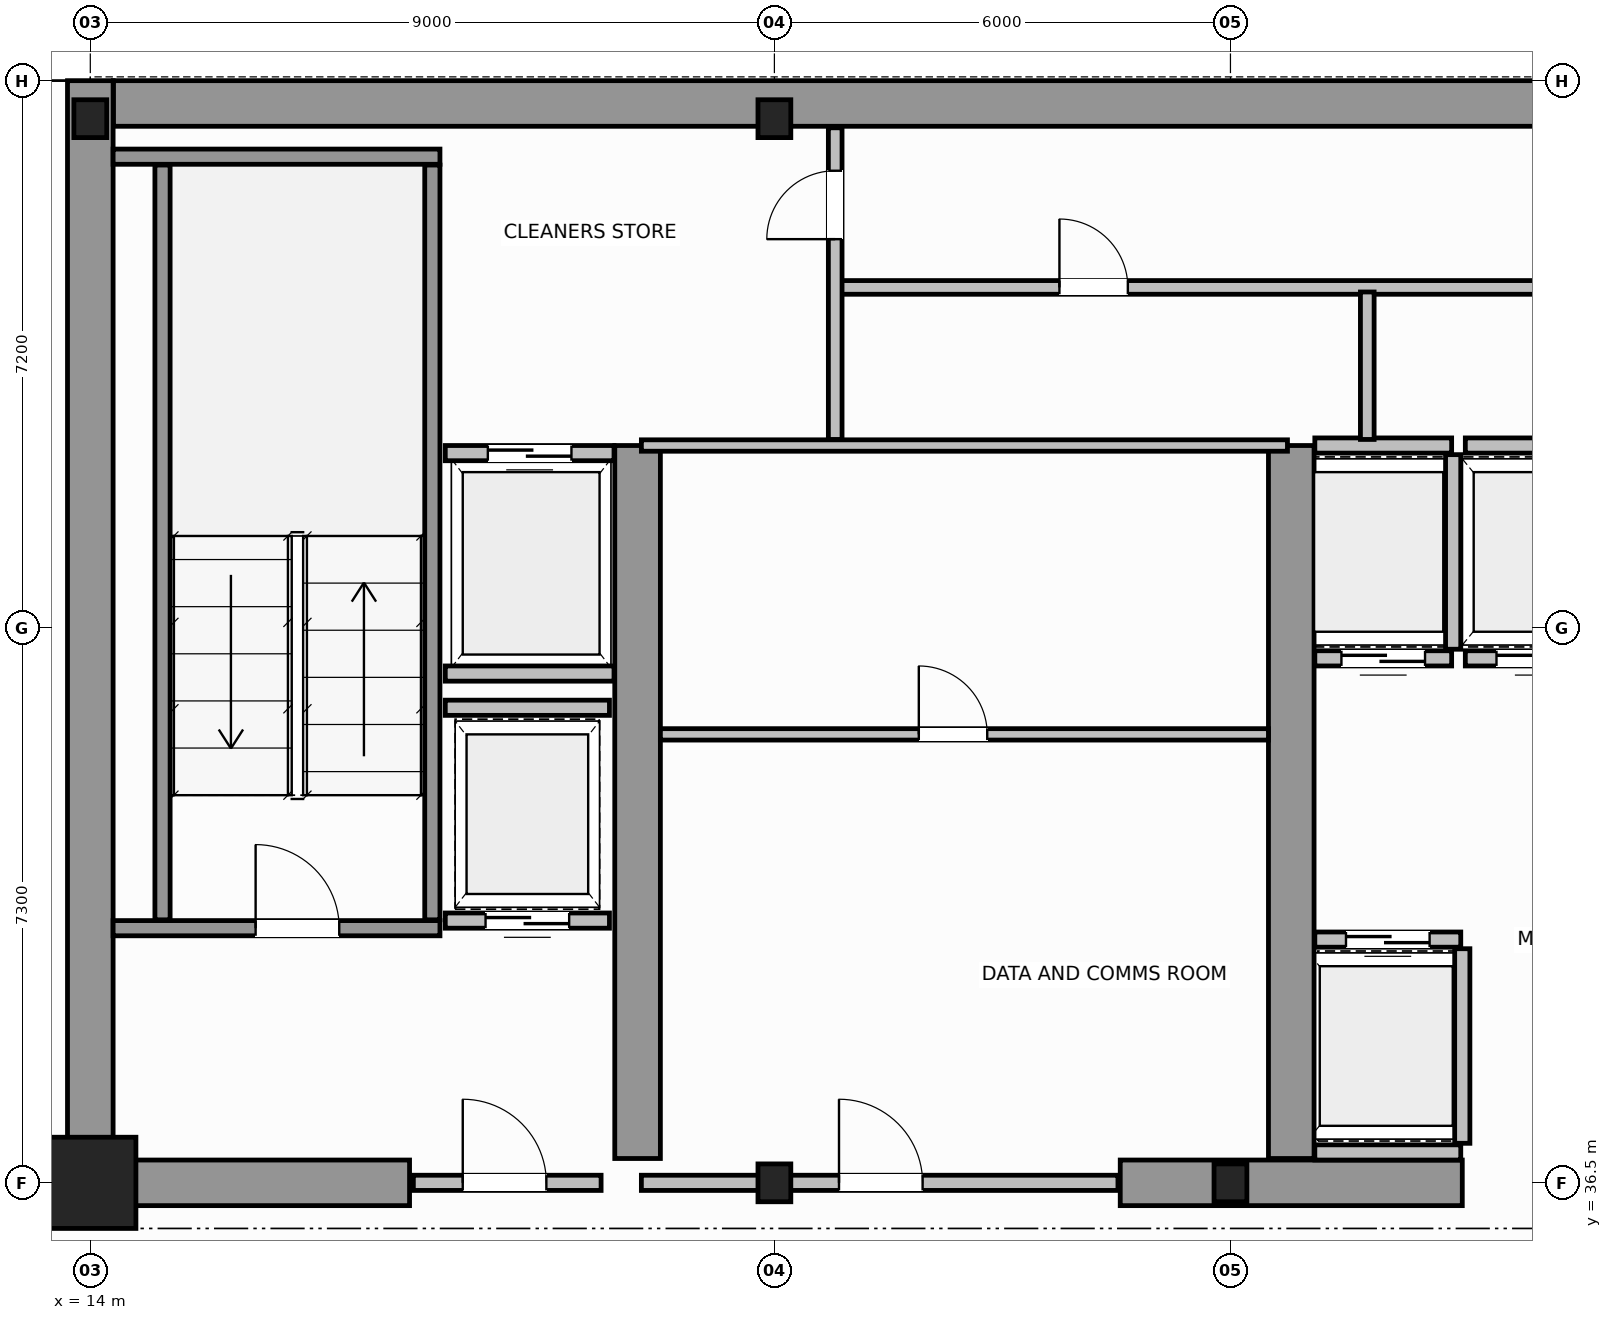
"""IFC4 building model, lengths in metres.
Left out: names, types, materials, properties, quantities, classifications, styles, units other than length and angle.
Written with IfcOpenShell. Run it as: python <this file> out.ifc"""

import sys

from ifc_helpers import new_model, si_unit, direction, frame, frame_2d, origin, origin_2d, place, context, subcontext, project, spatial, rectangle, i_section, extrude, source, transform, mapped, element, fill, save


model = new_model("IFC4")
c1 = context("Model", 3, precision=1e-05, world=origin(), true_north=direction((0.0, 1.0)))
c2 = subcontext(c1, "Body", "Model", "MODEL_VIEW")
j1 = project(units=[si_unit("LENGTHUNIT", "METRE"), si_unit("PLANEANGLEUNIT", "RADIAN")], contexts=[c1])
p1 = place(None, origin())
s1 = spatial("IfcSite", under=j1, at=p1, CompositionType="ELEMENT")
p2 = place(p1, origin())
s2 = spatial("IfcBuilding", under=s1, at=p2, CompositionType="ELEMENT")
p3 = place(p2, frame((0.0, 0.0, 199.4)))
s3 = spatial("IfcBuildingStorey", under=s2, at=p3, CompositionType="ELEMENT", Elevation=199.4)
m1 = source(origin(), c2, "Body", "SweptSolid", [
    extrude(rectangle(XDim=1.2, YDim=1.2, at=origin_2d()), origin(), (0.0, 0.0, 1.0), 3.8),
])
p4 = place(p3, frame((14.0, 36.5, 0.0), z_axis=(0.0, 0.0, 1.0), x_axis=(1.0, 0.0, 0.0)))
e1 = element("IfcColumn", 1, at=p4, inside=s3, PredefinedType="COLUMN", context=c2, shape_type="MappedRepresentation", body=[
    mapped(m1, transform((0.0, 0.0, 0.0), scale=1.0)),
])
m2 = source(origin(), c2, "Body", "SweptSolid", [
    extrude(i_section(OverallWidth=0.432, OverallDepth=0.498, WebThickness=0.055, FlangeThickness=0.068, FilletRadius=0.015, at=origin_2d()), origin(), (0.0, 0.0, 1.0), 3.8),
])
for number, where, z_axis, x_axis in (
    (2, (23.0, 36.5, 0.0), (0.0, 0.0, 1.0), (1.0, 0.0, 0.0)),
    (3, (29.0, 36.5, 0.0), (0.0, 0.0, 1.0), (1.0, 0.0, 0.0)),
    (4, (14.0, 50.5, 0.0), (0.0, 0.0, 1.0), (1.0, 0.0, 0.0)),
    (5, (23.0, 50.5, 0.0), (0.0, 0.0, 1.0), (1.0, 0.0, 0.0)),
):
    element("IfcColumn", number, at=place(p3, frame(where, z_axis=z_axis, x_axis=x_axis)), inside=s3, PredefinedType="COLUMN", context=c2, shape_type="MappedRepresentation", body=[
        mapped(m2, transform((0.0, 0.0, 0.0), scale=1.0)),
    ])
p5 = place(p3, frame((14.304, 50.7, 0.0), z_axis=(0.0, 0.0, 1.0), x_axis=(1.0, 0.0, 0.0)))
e6 = element("IfcWall", 6, at=p5, inside=s3, PredefinedType="SHEAR", context=c2, shape_type="SweptSolid", body=[
    extrude(rectangle(XDim=19.694, YDim=0.6, at=frame_2d((9.847, 0.0))), origin(), (0.0, 0.0, 1.0), 3.8),
])
p6 = place(p3, frame((14.0, 36.5, 0.0), z_axis=(0.0, 0.0, 1.0), x_axis=(0.0, 1.0, 0.0)))
e7 = element("IfcWall", 7, at=p6, inside=s3, PredefinedType="SHEAR", context=c2, shape_type="SweptSolid", body=[
    extrude(rectangle(XDim=14.5, YDim=0.6, at=frame_2d((7.25, 0.0))), origin(), (0.0, 0.0, 1.0), 3.8),
])
p7 = place(p3, frame((14.32, 36.5, 0.0), z_axis=(0.0, 0.0, 1.0), x_axis=(1.0, 0.0, 0.0)))
e8 = element("IfcWall", 8, at=p7, inside=s3, PredefinedType="SHEAR", context=c2, shape_type="SweptSolid", body=[
    extrude(rectangle(XDim=3.88, YDim=0.6, at=frame_2d((1.94, 0.0))), origin(), (0.0, 0.0, 1.0), 2.58),
])
p8 = place(p3, frame((27.55, 36.5, 0.0), z_axis=(0.0, 0.0, 1.0), x_axis=(1.0, 0.0, 0.0)))
e9 = element("IfcWall", 9, at=p8, inside=s3, PredefinedType="SHEAR", context=c2, shape_type="SweptSolid", body=[
    extrude(rectangle(XDim=4.5, YDim=0.6, at=frame_2d((2.25, 0.0))), origin(), (0.0, 0.0, 1.0), 3.8),
])
for number, where, z_axis, x_axis in (
    (10, (21.2, 36.82, 0.0), (0.0, 0.0, 1.0), (0.0, 1.0, 0.0)),
    (11, (29.8, 36.82, 0.0), (0.0, 0.0, 1.0), (0.0, 1.0, 0.0)),
):
    element("IfcWall", number, at=place(p3, frame(where, z_axis=z_axis, x_axis=x_axis)), inside=s3, PredefinedType="SHEAR", context=c2, shape_type="SweptSolid", body=[
        extrude(rectangle(XDim=9.38, YDim=0.6, at=frame_2d((4.69, 0.0))), origin(), (0.0, 0.0, 1.0), 3.8),
    ])
p9 = place(p3, frame((14.3, 39.85, 0.0), z_axis=(0.0, 0.0, 1.0), x_axis=(1.0, 0.0, 0.0)))
e12 = element("IfcWall", 12, at=p9, inside=s3, PredefinedType="SOLIDWALL", context=c2, shape_type="SweptSolid", body=[
    extrude(rectangle(XDim=4.3, YDim=0.2, at=frame_2d((2.15, 0.0))), origin(), (0.0, 0.0, 1.0), 3.8),
])
p10 = place(p9, frame((1.875, 0.0, 0.0)))
e13 = element("IfcOpeningElement", 13, at=p10, cuts=e12, PredefinedType="OPENING", context=c2, shape_type="SweptSolid", body=[
    extrude(rectangle(XDim=1.1, YDim=2.15, at=frame_2d((0.55, 1.075))), frame((0.0, 0.11, 0.0), z_axis=(0.0, -1.0, 0.0), x_axis=(1.0, 0.0, 0.0)), (0.0, 0.0, 1.0), 0.22),
])
p11 = place(p3, frame((14.3, 50.0, 0.0), z_axis=(0.0, 0.0, 1.0), x_axis=(1.0, 0.0, 0.0)))
e14 = element("IfcWall", 14, at=p11, inside=s3, PredefinedType="SOLIDWALL", context=c2, shape_type="SweptSolid", body=[
    extrude(rectangle(XDim=4.3, YDim=0.2, at=frame_2d((2.15, 0.0))), origin(), (0.0, 0.0, 1.0), 3.8),
])
for number, where, z_axis, x_axis in (
    (15, (14.95, 39.96, 0.0), (0.0, 0.0, 1.0), (0.0, 1.0, 0.0)),
    (16, (18.5, 39.96, 0.0), (0.0, 0.0, 1.0), (0.0, 1.0, 0.0)),
):
    element("IfcWall", number, at=place(p3, frame(where, z_axis=z_axis, x_axis=x_axis)), inside=s3, PredefinedType="SOLIDWALL", context=c2, shape_type="SweptSolid", body=[
        extrude(rectangle(XDim=9.93, YDim=0.2, at=frame_2d((4.965, 0.0))), origin(), (0.0, 0.0, 1.0), 3.8),
    ])
p12 = place(p3, frame((18.25, 36.5, 0.0), z_axis=(0.0, 0.0, 1.0), x_axis=(1.0, 0.0, 0.0)))
e17 = element("IfcWall", 17, at=p12, inside=s3, PredefinedType="SOLIDWALL", context=c2, shape_type="SweptSolid", body=[
    extrude(rectangle(XDim=2.47, YDim=0.2, at=frame_2d((1.235, 0.0))), origin(), (0.0, 0.0, 1.0), 2.57),
])
p13 = place(p12, frame((0.65, 0.0, 0.0)))
e18 = element("IfcOpeningElement", 18, at=p13, cuts=e17, PredefinedType="OPENING", context=c2, shape_type="SweptSolid", body=[
    extrude(rectangle(XDim=1.1, YDim=2.15, at=frame_2d((0.55, 1.075))), frame((0.0, 0.11, 0.0), z_axis=(0.0, -1.0, 0.0), x_axis=(1.0, 0.0, 0.0)), (0.0, 0.0, 1.0), 0.22),
])
p14 = place(p3, frame((30.11, 39.7, 0.0), z_axis=(0.0, 0.0, 1.0), x_axis=(1.0, 0.0, 0.0)))
e19 = element("IfcWall", 19, at=p14, inside=s3, PredefinedType="SOLIDWALL", context=c2, shape_type="SweptSolid", body=[
    extrude(rectangle(XDim=1.92, YDim=0.2, at=frame_2d((0.96, 0.0))), origin(), (0.0, 0.0, 1.0), 3.58),
])
p15 = place(p14, frame((0.41, 0.0, 0.0)))
e20 = element("IfcOpeningElement", 20, at=p15, cuts=e19, PredefinedType="OPENING", context=c2, shape_type="SweptSolid", body=[
    extrude(rectangle(XDim=1.1, YDim=2.15, at=frame_2d((0.55, 1.075))), frame((0.0, 0.11, 0.0), z_axis=(0.0, -1.0, 0.0), x_axis=(1.0, 0.0, 0.0)), (0.0, 0.0, 1.0), 0.22),
])
p16 = place(p3, frame((30.11, 36.9, 0.0), z_axis=(0.0, 0.0, 1.0), x_axis=(1.0, 0.0, 0.0)))
e21 = element("IfcWall", 21, at=p16, inside=s3, PredefinedType="SOLIDWALL", context=c2, shape_type="SweptSolid", body=[
    extrude(rectangle(XDim=1.92, YDim=0.2, at=frame_2d((0.96, 0.0))), origin(), (0.0, 0.0, 1.0), 3.58),
])
p17 = place(p3, frame((32.05, 37.02, 0.0), z_axis=(0.0, 0.0, 1.0), x_axis=(0.0, 1.0, 0.0)))
e22 = element("IfcWall", 22, at=p17, inside=s3, PredefinedType="SOLIDWALL", context=c2, shape_type="SweptSolid", body=[
    extrude(rectangle(XDim=2.56, YDim=0.2, at=frame_2d((1.28, 0.0))), origin(), (0.0, 0.0, 1.0), 3.58),
])
p18 = place(p3, frame((30.11, 43.4, 0.0), z_axis=(0.0, 0.0, 1.0), x_axis=(1.0, 0.0, 0.0)))
e23 = element("IfcWall", 23, at=p18, inside=s3, PredefinedType="SOLIDWALL", context=c2, shape_type="SweptSolid", body=[
    extrude(rectangle(XDim=1.8, YDim=0.2, at=frame_2d((0.9, 0.0))), origin(), (0.0, 0.0, 1.0), 3.58),
])
p19 = place(p18, frame((0.35, 0.0, 0.0)))
e24 = element("IfcOpeningElement", 24, at=p19, cuts=e23, PredefinedType="OPENING", context=c2, shape_type="SweptSolid", body=[
    extrude(rectangle(XDim=1.1, YDim=2.15, at=frame_2d((0.55, 1.075))), frame((0.0, 0.11, 0.0), z_axis=(0.0, -1.0, 0.0), x_axis=(1.0, 0.0, 0.0)), (0.0, 0.0, 1.0), 0.22),
])
p20 = place(p3, frame((30.11, 46.2, 0.0), z_axis=(0.0, 0.0, 1.0), x_axis=(1.0, 0.0, 0.0)))
e25 = element("IfcWall", 25, at=p20, inside=s3, PredefinedType="SOLIDWALL", context=c2, shape_type="SweptSolid", body=[
    extrude(rectangle(XDim=1.8, YDim=0.2, at=frame_2d((0.9, 0.0))), origin(), (0.0, 0.0, 1.0), 3.58),
])
p21 = place(p3, frame((31.93, 43.52, 0.0), z_axis=(0.0, 0.0, 1.0), x_axis=(0.0, 1.0, 0.0)))
e26 = element("IfcWall", 26, at=p21, inside=s3, PredefinedType="SOLIDWALL", context=c2, shape_type="SweptSolid", body=[
    extrude(rectangle(XDim=2.56, YDim=0.2, at=frame_2d((1.28, 0.0))), origin(), (0.0, 0.0, 1.0), 3.58),
])
p22 = place(p3, frame((32.09, 43.4, 0.0), z_axis=(0.0, 0.0, 1.0), x_axis=(1.0, 0.0, 0.0)))
e27 = element("IfcWall", 27, at=p22, inside=s3, PredefinedType="SOLIDWALL", context=c2, shape_type="SweptSolid", body=[
    extrude(rectangle(XDim=1.92, YDim=0.2, at=frame_2d((0.96, 0.0))), origin(), (0.0, 0.0, 1.0), 3.58),
])
p23 = place(p22, frame((0.41, 0.0, 0.0)))
e28 = element("IfcOpeningElement", 28, at=p23, cuts=e27, PredefinedType="OPENING", context=c2, shape_type="SweptSolid", body=[
    extrude(rectangle(XDim=1.1, YDim=2.15, at=frame_2d((0.55, 1.075))), frame((0.0, 0.11, 0.0), z_axis=(0.0, -1.0, 0.0), x_axis=(1.0, 0.0, 0.0)), (0.0, 0.0, 1.0), 0.22),
])
p24 = place(p3, frame((32.09, 46.2, 0.0), z_axis=(0.0, 0.0, 1.0), x_axis=(1.0, 0.0, 0.0)))
e29 = element("IfcWall", 29, at=p24, inside=s3, PredefinedType="SOLIDWALL", context=c2, shape_type="SweptSolid", body=[
    extrude(rectangle(XDim=1.92, YDim=0.2, at=frame_2d((0.96, 0.0))), origin(), (0.0, 0.0, 1.0), 3.58),
])
p25 = place(p3, frame((18.67, 46.1, 0.0), z_axis=(0.0, 0.0, 1.0), x_axis=(1.0, 0.0, 0.0)))
e30 = element("IfcWall", 30, at=p25, inside=s3, PredefinedType="SOLIDWALL", context=c2, shape_type="SweptSolid", body=[
    extrude(rectangle(XDim=2.22, YDim=0.2, at=frame_2d((1.11, 0.0))), origin(), (0.0, 0.0, 1.0), 3.58),
])
p26 = place(p25, frame((0.56, 0.0, 0.0)))
e31 = element("IfcOpeningElement", 31, at=p26, cuts=e30, PredefinedType="OPENING", context=c2, shape_type="SweptSolid", body=[
    extrude(rectangle(XDim=1.1, YDim=2.15, at=frame_2d((0.55, 1.075))), frame((0.0, 0.11, 0.0), z_axis=(0.0, -1.0, 0.0), x_axis=(1.0, 0.0, 0.0)), (0.0, 0.0, 1.0), 0.22),
])
p27 = place(p3, frame((18.67, 43.2, 0.0), z_axis=(0.0, 0.0, 1.0), x_axis=(1.0, 0.0, 0.0)))
e32 = element("IfcWall", 32, at=p27, inside=s3, PredefinedType="SOLIDWALL", context=c2, shape_type="SweptSolid", body=[
    extrude(rectangle(XDim=2.22, YDim=0.2, at=frame_2d((1.11, 0.0))), origin(), (0.0, 0.0, 1.0), 3.58),
])
p28 = place(p3, frame((18.67, 39.95, 0.0), z_axis=(0.0, 0.0, 1.0), x_axis=(1.0, 0.0, 0.0)))
e33 = element("IfcWall", 33, at=p28, inside=s3, PredefinedType="SOLIDWALL", context=c2, shape_type="SweptSolid", body=[
    extrude(rectangle(XDim=2.16, YDim=0.2, at=frame_2d((1.08, 0.0))), origin(), (0.0, 0.0, 1.0), 3.58),
])
p29 = place(p28, frame((0.53, 0.0, 0.0)))
e34 = element("IfcOpeningElement", 34, at=p29, cuts=e33, PredefinedType="OPENING", context=c2, shape_type="SweptSolid", body=[
    extrude(rectangle(XDim=1.1, YDim=2.15, at=frame_2d((0.55, 1.075))), frame((0.0, 0.11, 0.0), z_axis=(0.0, -1.0, 0.0), x_axis=(1.0, 0.0, 0.0)), (0.0, 0.0, 1.0), 0.22),
])
p30 = place(p3, frame((18.67, 42.75, 0.0), z_axis=(0.0, 0.0, 1.0), x_axis=(1.0, 0.0, 0.0)))
e35 = element("IfcWall", 35, at=p30, inside=s3, PredefinedType="SOLIDWALL", context=c2, shape_type="SweptSolid", body=[
    extrude(rectangle(XDim=2.16, YDim=0.2, at=frame_2d((1.08, 0.0))), origin(), (0.0, 0.0, 1.0), 3.58),
])
p31 = place(p3, frame((21.25, 36.5, 0.0), z_axis=(0.0, 0.0, 1.0), x_axis=(1.0, 0.0, 0.0)))
e36 = element("IfcWall", 36, at=p31, inside=s3, PredefinedType="SOLIDWALL", context=c2, shape_type="SweptSolid", body=[
    extrude(rectangle(XDim=6.27, YDim=0.2, at=frame_2d((3.135, 0.0))), origin(), (0.0, 0.0, 1.0), 2.57),
])
p32 = place(p31, frame((2.6, 0.0, 0.0)))
e37 = element("IfcOpeningElement", 37, at=p32, cuts=e36, PredefinedType="OPENING", context=c2, shape_type="SweptSolid", body=[
    extrude(rectangle(XDim=1.1, YDim=2.15, at=frame_2d((0.55, 1.075))), frame((0.0, 0.11, 0.0), z_axis=(0.0, -1.0, 0.0), x_axis=(1.0, 0.0, 0.0)), (0.0, 0.0, 1.0), 0.22),
])
p33 = place(p3, frame((21.25, 46.2, 0.0), z_axis=(0.0, 0.0, 1.0), x_axis=(1.0, 0.0, 0.0)))
e38 = element("IfcWall", 38, at=p33, inside=s3, PredefinedType="PARTITIONING", context=c2, shape_type="SweptSolid", body=[
    extrude(rectangle(XDim=8.5, YDim=0.15, at=frame_2d((4.25, 0.0))), origin(), (0.0, 0.0, 1.0), 3.58),
])
p34 = place(p3, frame((21.5, 42.4, 0.0), z_axis=(0.0, 0.0, 1.0), x_axis=(1.0, 0.0, 0.0)))
e39 = element("IfcWall", 39, at=p34, inside=s3, PredefinedType="PARTITIONING", context=c2, shape_type="SweptSolid", body=[
    extrude(rectangle(XDim=8.0, YDim=0.15, at=frame_2d((4.0, 0.0))), origin(), (0.0, 0.0, 1.0), 3.58),
])
p35 = place(p34, frame((3.4, 0.0, 0.0)))
e40 = element("IfcOpeningElement", 40, at=p35, cuts=e39, PredefinedType="OPENING", context=c2, shape_type="SweptSolid", body=[
    extrude(rectangle(XDim=0.9, YDim=2.1, at=frame_2d((0.45, 1.05))), frame((0.0, 0.085, 0.0), z_axis=(0.0, -1.0, 0.0), x_axis=(1.0, 0.0, 0.0)), (0.0, 0.0, 1.0), 0.17),
])
p36 = place(p3, frame((23.85, 48.28, 0.0), z_axis=(0.0, 0.0, 1.0), x_axis=(1.0, 0.0, 0.0)))
e41 = element("IfcWall", 41, at=p36, inside=s3, PredefinedType="PLUMBINGWALL", context=c2, shape_type="SweptSolid", body=[
    extrude(rectangle(XDim=15.03, YDim=0.18, at=frame_2d((7.515, 0.0))), origin(), (0.0, 0.0, 1.0), 3.58),
])
p37 = place(p36, frame((2.9, 0.0, 0.0)))
e42 = element("IfcOpeningElement", 42, at=p37, cuts=e41, PredefinedType="OPENING", context=c2, shape_type="SweptSolid", body=[
    extrude(rectangle(XDim=0.9, YDim=2.15, at=frame_2d((0.45, 1.075))), frame((0.0, 0.1, 0.0), z_axis=(0.0, -1.0, 0.0), x_axis=(1.0, 0.0, 0.0)), (0.0, 0.0, 1.0), 0.2),
])
p38 = place(p36, frame((10.4, 0.0, 0.0)))
e43 = element("IfcOpeningElement", 43, at=p38, cuts=e41, PredefinedType="OPENING", context=c2, shape_type="SweptSolid", body=[
    extrude(rectangle(XDim=0.9, YDim=2.15, at=frame_2d((0.45, 1.075))), frame((0.0, 0.1, 0.0), z_axis=(0.0, -1.0, 0.0), x_axis=(1.0, 0.0, 0.0)), (0.0, 0.0, 1.0), 0.2),
])
p39 = place(p3, frame((23.8, 46.28, 0.0), z_axis=(0.0, 0.0, 1.0), x_axis=(0.0, 1.0, 0.0)))
e44 = element("IfcWall", 44, at=p39, inside=s3, PredefinedType="PLUMBINGWALL", context=c2, shape_type="SweptSolid", body=[
    extrude(rectangle(XDim=4.1, YDim=0.18, at=frame_2d((2.05, 0.0))), origin(), (0.0, 0.0, 1.0), 3.58),
])
p40 = place(p39, frame((2.635, 0.0, 0.0)))
e45 = element("IfcOpeningElement", 45, at=p40, cuts=e44, PredefinedType="OPENING", context=c2, shape_type="SweptSolid", body=[
    extrude(rectangle(XDim=0.9, YDim=2.15, at=frame_2d((0.45, 1.075))), frame((0.0, 0.1, 0.0), z_axis=(0.0, -1.0, 0.0), x_axis=(1.0, 0.0, 0.0)), (0.0, 0.0, 1.0), 0.2),
])
p41 = place(p3, frame((30.8, 46.28, 0.0), z_axis=(0.0, 0.0, 1.0), x_axis=(0.0, 1.0, 0.0)))
e46 = element("IfcWall", 46, at=p41, inside=s3, PredefinedType="PLUMBINGWALL", context=c2, shape_type="SweptSolid", body=[
    extrude(rectangle(XDim=1.94, YDim=0.18, at=frame_2d((0.97, 0.0))), origin(), (0.0, 0.0, 1.0), 3.58),
])
p42 = place(p3, frame((7.289, 36.48, 0.0), z_axis=(0.0, 0.0, 1.0), x_axis=(1.0, 0.0, 0.0)))
e47 = element("IfcWall", 47, at=p42, inside=s3, PredefinedType="PARTITIONING", context=c2, shape_type="SweptSolid", body=[
    extrude(rectangle(XDim=6.651, YDim=0.12, at=frame_2d((3.325, 0.0))), origin(), (0.0, 0.0, 1.0), 2.97),
])
p43 = place(p42, frame((2.875, 0.0, 0.0)))
e48 = element("IfcOpeningElement", 48, at=p43, cuts=e47, PredefinedType="OPENING", context=c2, shape_type="SweptSolid", body=[
    extrude(rectangle(XDim=0.9, YDim=2.15, at=frame_2d((0.45, 1.075))), frame((0.0, 0.07, 0.0), z_axis=(0.0, -1.0, 0.0), x_axis=(1.0, 0.0, 0.0)), (0.0, 0.0, 1.0), 0.14),
])
m3 = source(origin(), c2, "Body", "SweptSolid", [
    extrude(rectangle(XDim=1.1, YDim=2.15, at=frame_2d((0.55, 1.075))), frame((0.0, 0.025, 0.0), z_axis=(0.0, -1.0, 0.0), x_axis=(1.0, 0.0, 0.0)), (0.0, 0.0, 1.0), 0.05),
])
p44 = place(p10, origin())
e49 = element("IfcDoor", 49, at=p44, inside=s3, OperationType="SINGLE_SWING_LEFT", PredefinedType="DOOR", context=c2, shape_type="MappedRepresentation", body=[
    mapped(m3, transform((0.0, 0.0, 0.0), scale=1.0)),
])
fill(e13, e49)
p45 = place(p13, origin())
e50 = element("IfcDoor", 50, at=p45, inside=s3, OperationType="SINGLE_SWING_RIGHT", PredefinedType="DOOR", context=c2, shape_type="MappedRepresentation", body=[
    mapped(m3, transform((0.0, 0.0, 0.0), scale=1.0)),
])
fill(e18, e50)
p46 = place(p15, origin())
e51 = element("IfcDoor", 51, at=p46, inside=s3, OperationType="DOUBLE_DOOR_SLIDING", PredefinedType="DOOR", context=c2, shape_type="MappedRepresentation", body=[
    mapped(m3, transform((0.0, 0.0, 0.0), scale=1.0)),
])
fill(e20, e51)
p47 = place(p19, origin())
e52 = element("IfcDoor", 52, at=p47, inside=s3, OperationType="DOUBLE_DOOR_SLIDING", PredefinedType="DOOR", context=c2, shape_type="MappedRepresentation", body=[
    mapped(m3, transform((0.0, 0.0, 0.0), scale=1.0)),
])
fill(e24, e52)
p48 = place(p23, origin())
e53 = element("IfcDoor", 53, at=p48, inside=s3, OperationType="DOUBLE_DOOR_SLIDING", PredefinedType="DOOR", context=c2, shape_type="MappedRepresentation", body=[
    mapped(m3, transform((0.0, 0.0, 0.0), scale=1.0)),
])
fill(e28, e53)
p49 = place(p26, origin())
e54 = element("IfcDoor", 54, at=p49, inside=s3, OperationType="DOUBLE_DOOR_SLIDING", PredefinedType="DOOR", context=c2, shape_type="MappedRepresentation", body=[
    mapped(m3, transform((0.0, 0.0, 0.0), scale=1.0)),
])
fill(e31, e54)
p50 = place(p29, origin())
e55 = element("IfcDoor", 55, at=p50, inside=s3, OperationType="DOUBLE_DOOR_SLIDING", PredefinedType="DOOR", context=c2, shape_type="MappedRepresentation", body=[
    mapped(m3, transform((0.0, 0.0, 0.0), scale=1.0)),
])
fill(e34, e55)
p51 = place(p32, origin())
e56 = element("IfcDoor", 56, at=p51, inside=s3, OperationType="SINGLE_SWING_LEFT", PredefinedType="DOOR", context=c2, shape_type="MappedRepresentation", body=[
    mapped(m3, transform((0.0, 0.0, 0.0), scale=1.0)),
])
fill(e37, e56)
m4 = source(origin(), c2, "Body", "SweptSolid", [
    extrude(rectangle(XDim=0.9, YDim=2.1, at=frame_2d((0.45, 1.05))), frame((0.0, 0.025, 0.0), z_axis=(0.0, -1.0, 0.0), x_axis=(1.0, 0.0, 0.0)), (0.0, 0.0, 1.0), 0.05),
])
p52 = place(p35, origin())
e57 = element("IfcDoor", 57, at=p52, inside=s3, OperationType="SINGLE_SWING_RIGHT", PredefinedType="DOOR", context=c2, shape_type="MappedRepresentation", body=[
    mapped(m4, transform((0.0, 0.0, 0.0), scale=1.0)),
])
fill(e40, e57)
m5 = source(origin(), c2, "Body", "SweptSolid", [
    extrude(rectangle(XDim=0.9, YDim=2.15, at=frame_2d((0.45, 1.075))), frame((0.0, 0.025, 0.0), z_axis=(0.0, -1.0, 0.0), x_axis=(1.0, 0.0, 0.0)), (0.0, 0.0, 1.0), 0.05),
])
p53 = place(p40, origin())
e58 = element("IfcDoor", 58, at=p53, inside=s3, OperationType="SINGLE_SWING_LEFT", PredefinedType="DOOR", context=c2, shape_type="MappedRepresentation", body=[
    mapped(m5, transform((0.0, 0.0, 0.0), scale=1.0)),
])
fill(e45, e58)
p54 = place(p37, origin())
e59 = element("IfcDoor", 59, at=p54, inside=s3, OperationType="SINGLE_SWING_RIGHT", PredefinedType="DOOR", context=c2, shape_type="MappedRepresentation", body=[
    mapped(m5, transform((0.0, 0.0, 0.0), scale=1.0)),
])
fill(e42, e59)
save(model, sys.argv[1])
